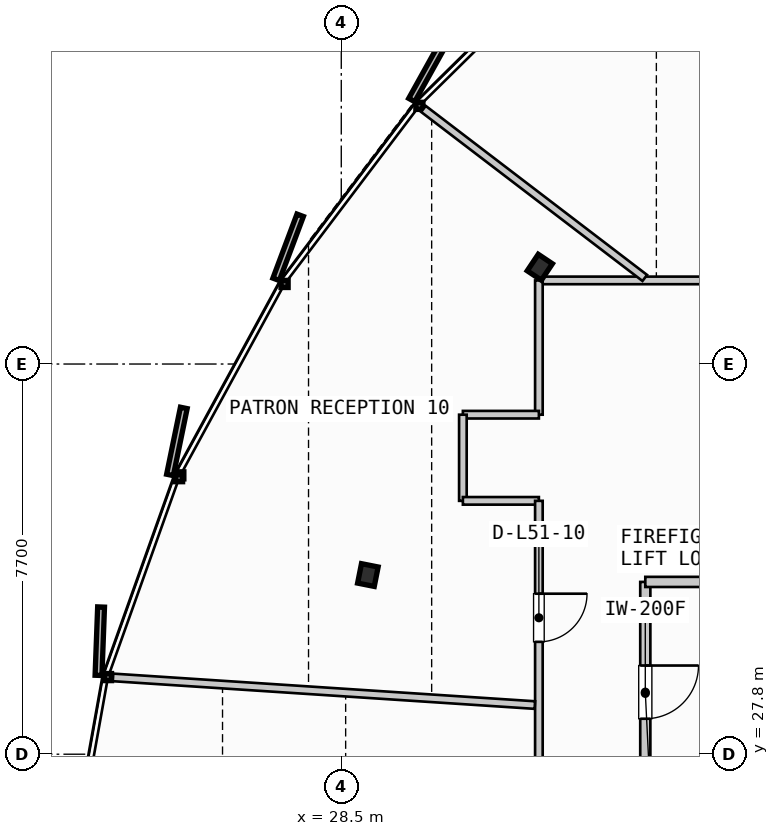
"""IFC4 building model, lengths in metres.
Left out: names, types, materials, properties, quantities, classifications, styles, units other than length and angle.
Written with IfcOpenShell. Run it as: python <this file> out.ifc"""

import sys

from ifc_helpers import new_model, si_unit, direction, frame, frame_2d, origin, origin_2d, place, context, subcontext, project, spatial, rectangle, i_section, extrude, source, transform, mapped, element, fill, save


model = new_model("IFC4")
c1 = context("Model", 3, precision=1e-05, world=origin(), true_north=direction((0.0, 1.0)))
c2 = subcontext(c1, "Body", "Model", "MODEL_VIEW")
j1 = project(units=[si_unit("LENGTHUNIT", "METRE"), si_unit("PLANEANGLEUNIT", "RADIAN")], contexts=[c1])
p1 = place(None, origin())
s1 = spatial("IfcSite", under=j1, at=p1, CompositionType="ELEMENT")
p2 = place(p1, origin())
s2 = spatial("IfcBuilding", under=s1, at=p2, CompositionType="ELEMENT")
p3 = place(p2, frame((0.0, 0.0, 197.4)))
s3 = spatial("IfcBuildingStorey", under=s2, at=p3, CompositionType="ELEMENT", Elevation=197.4)
m1 = source(origin(), c2, "Body", "SweptSolid", [
    extrude(i_section(OverallWidth=0.391, OverallDepth=0.335, WebThickness=0.023, FlangeThickness=0.034, FilletRadius=0.015, at=origin_2d()), origin(), (0.0, 0.0, 1.0), 3.26),
])
for number, where, z_axis, x_axis in (
    (1, (32.418, 37.409, 0.0), (0.0, 0.0, 1.0), (-0.831, 0.556, 0.0)),
    (2, (29.025, 31.336, 0.0), (0.0, 0.0, 1.0), (-0.981, 0.195, 0.0)),
):
    element("IfcColumn", number, at=place(p3, frame(where, z_axis=z_axis, x_axis=x_axis)), inside=s3, PredefinedType="COLUMN", context=c2, shape_type="MappedRepresentation", body=[
        mapped(m1, transform((0.0, 0.0, 0.0), scale=1.0)),
    ])
p4 = place(p3, frame((34.5, 31.2, 0.0), z_axis=(0.0, 0.0, 1.0), x_axis=(0.0, -1.0, 0.0)))
e3 = element("IfcWall", 3, at=p4, inside=s3, PredefinedType="PARTITIONING", context=c2, shape_type="SweptSolid", body=[
    extrude(rectangle(XDim=4.4, YDim=0.2, at=frame_2d((2.2, 0.0))), origin(), (0.0, 0.0, 1.0), 2.595),
])
p5 = place(p4, frame((1.65, 0.0, 0.0)))
e4 = element("IfcOpeningElement", 4, at=p5, cuts=e3, PredefinedType="OPENING", context=c2, shape_type="SweptSolid", body=[
    extrude(rectangle(XDim=1.05, YDim=2.15, at=frame_2d((0.525, 1.075))), frame((0.0, 0.11, 0.0), z_axis=(0.0, -1.0, 0.0), x_axis=(1.0, 0.0, 0.0)), (0.0, 0.0, 1.0), 0.22),
])
p6 = place(p3, frame((34.5, 31.2, 0.0), z_axis=(0.0, 0.0, 1.0), x_axis=(1.0, 0.0, 0.0)))
e5 = element("IfcWall", 5, at=p6, inside=s3, PredefinedType="PARTITIONING", context=c2, shape_type="SweptSolid", body=[
    extrude(rectangle(XDim=3.215, YDim=0.2, at=frame_2d((1.607, 0.0))), origin(), (0.0, 0.0, 1.0), 2.595),
])
p7 = place(p3, frame((60.75, 37.15, 0.0), z_axis=(0.0, 0.0, 1.0), x_axis=(-1.0, 0.0, 0.0)))
e6 = element("IfcWall", 6, at=p7, inside=s3, PredefinedType="PARTITIONING", context=c2, shape_type="SweptSolid", body=[
    extrude(rectangle(XDim=28.35, YDim=0.15, at=frame_2d((14.175, 0.0))), origin(), (0.0, 0.0, 1.0), 2.595),
])
p8 = place(p7, frame((4.612, 0.0, 0.0)))
e7 = element("IfcOpeningElement", 7, at=p8, cuts=e6, PredefinedType="OPENING", context=c2, shape_type="SweptSolid", body=[
    extrude(rectangle(XDim=0.95, YDim=2.15, at=frame_2d((0.475, 1.075))), frame((0.0, 0.085, 0.0), z_axis=(0.0, -1.0, 0.0), x_axis=(1.0, 0.0, 0.0)), (0.0, 0.0, 1.0), 0.17),
])
p9 = place(p7, frame((10.803, 0.0, 0.0)))
e8 = element("IfcOpeningElement", 8, at=p9, cuts=e6, PredefinedType="OPENING", context=c2, shape_type="SweptSolid", body=[
    extrude(rectangle(XDim=0.95, YDim=2.15, at=frame_2d((0.475, 1.075))), frame((0.0, 0.085, 0.0), z_axis=(0.0, -1.0, 0.0), x_axis=(1.0, 0.0, 0.0)), (0.0, 0.0, 1.0), 0.17),
])
p10 = place(p7, frame((15.534, 0.0, 0.0)))
e9 = element("IfcOpeningElement", 9, at=p10, cuts=e6, PredefinedType="OPENING", context=c2, shape_type="SweptSolid", body=[
    extrude(rectangle(XDim=0.95, YDim=2.15, at=frame_2d((0.475, 1.075))), frame((0.0, 0.085, 0.0), z_axis=(0.0, -1.0, 0.0), x_axis=(1.0, 0.0, 0.0)), (0.0, 0.0, 1.0), 0.17),
])
p11 = place(p7, frame((22.208, 0.0, 0.0)))
e10 = element("IfcOpeningElement", 10, at=p11, cuts=e6, PredefinedType="OPENING", context=c2, shape_type="SweptSolid", body=[
    extrude(rectangle(XDim=0.95, YDim=2.15, at=frame_2d((0.475, 1.075))), frame((0.0, 0.085, 0.0), z_axis=(0.0, -1.0, 0.0), x_axis=(1.0, 0.0, 0.0)), (0.0, 0.0, 1.0), 0.17),
])
p12 = place(p3, frame((32.4, 37.15, 0.0), z_axis=(0.0, 0.0, 1.0), x_axis=(0.0, -1.0, 0.0)))
e11 = element("IfcWall", 11, at=p12, inside=s3, PredefinedType="PARTITIONING", context=c2, shape_type="SweptSolid", body=[
    extrude(rectangle(XDim=2.65, YDim=0.15, at=frame_2d((1.325, 0.0))), origin(), (0.0, 0.0, 1.0), 2.595),
])
p13 = place(p3, frame((32.4, 34.5, 0.0), z_axis=(0.0, 0.0, 1.0), x_axis=(-1.0, 0.0, 0.0)))
e12 = element("IfcWall", 12, at=p13, inside=s3, PredefinedType="PARTITIONING", context=c2, shape_type="SweptSolid", body=[
    extrude(rectangle(XDim=1.5, YDim=0.15, at=frame_2d((0.75, 0.0))), origin(), (0.0, 0.0, 1.0), 2.595),
])
p14 = place(p3, frame((30.9, 34.5, 0.0), z_axis=(0.0, 0.0, 1.0), x_axis=(0.0, -1.0, 0.0)))
e13 = element("IfcWall", 13, at=p14, inside=s3, PredefinedType="PARTITIONING", context=c2, shape_type="SweptSolid", body=[
    extrude(rectangle(XDim=1.7, YDim=0.15, at=frame_2d((0.85, 0.0))), origin(), (0.0, 0.0, 1.0), 2.595),
])
p15 = place(p3, frame((30.9, 32.8, 0.0), z_axis=(0.0, 0.0, 1.0), x_axis=(1.0, 0.0, 0.0)))
e14 = element("IfcWall", 14, at=p15, inside=s3, PredefinedType="PARTITIONING", context=c2, shape_type="SweptSolid", body=[
    extrude(rectangle(XDim=1.5, YDim=0.15, at=frame_2d((0.75, 0.0))), origin(), (0.0, 0.0, 1.0), 2.595),
])
p16 = place(p3, frame((32.4, 32.8, 0.0), z_axis=(0.0, 0.0, 1.0), x_axis=(0.0, -1.0, 0.0)))
e15 = element("IfcWall", 15, at=p16, inside=s3, PredefinedType="PARTITIONING", context=c2, shape_type="SweptSolid", body=[
    extrude(rectangle(XDim=10.0, YDim=0.15, at=frame_2d((5.0, 0.0))), origin(), (0.0, 0.0, 1.0), 2.595),
])
p17 = place(p16, frame((1.833, 0.0, 0.0)))
e16 = element("IfcOpeningElement", 16, at=p17, cuts=e15, PredefinedType="OPENING", context=c2, shape_type="SweptSolid", body=[
    extrude(rectangle(XDim=0.95, YDim=2.15, at=frame_2d((0.475, 1.075))), frame((0.0, 0.085, 0.0), z_axis=(0.0, -1.0, 0.0), x_axis=(1.0, 0.0, 0.0)), (0.0, 0.0, 1.0), 0.17),
])
p18 = place(p16, frame((6.252, 0.0, 0.0)))
e17 = element("IfcOpeningElement", 17, at=p18, cuts=e15, PredefinedType="OPENING", context=c2, shape_type="SweptSolid", body=[
    extrude(rectangle(XDim=0.95, YDim=2.15, at=frame_2d((0.475, 1.075))), frame((0.0, 0.085, 0.0), z_axis=(0.0, -1.0, 0.0), x_axis=(1.0, 0.0, 0.0)), (0.0, 0.0, 1.0), 0.17),
])
p19 = place(p3, frame((34.49, 37.198, 0.0), z_axis=(0.0, 0.0, 1.0), x_axis=(-0.794783785462, 0.606892687686, 0.0)))
e18 = element("IfcWall", 18, at=p19, inside=s3, PredefinedType="PARTITIONING", context=c2, shape_type="SweptSolid", body=[
    extrude(rectangle(XDim=5.496, YDim=0.15, at=frame_2d((2.748, 0.0))), origin(), (0.0, 0.0, 1.0), 2.595),
])
p20 = place(p3, frame((32.32, 28.77, 0.0), z_axis=(0.0, 0.0, 1.0), x_axis=(-0.997858734146, 0.06540601416, 0.0)))
e19 = element("IfcWall", 19, at=p20, inside=s3, PredefinedType="PARTITIONING", context=c2, shape_type="SweptSolid", body=[
    extrude(rectangle(XDim=8.343, YDim=0.15, at=frame_2d((4.171, 0.0))), origin(), (0.0, 0.0, 1.0), 2.595),
])
m2 = source(origin(), c2, "Body", "SweptSolid", [
    extrude(rectangle(XDim=1.05, YDim=2.15, at=frame_2d((0.525, 1.075))), frame((0.0, 0.025, 0.0), z_axis=(0.0, -1.0, 0.0), x_axis=(1.0, 0.0, 0.0)), (0.0, 0.0, 1.0), 0.05),
])
p21 = place(p5, origin())
e20 = element("IfcDoor", 20, at=p21, inside=s3, OperationType="SINGLE_SWING_LEFT", PredefinedType="DOOR", context=c2, shape_type="MappedRepresentation", body=[
    mapped(m2, transform((0.0, 0.0, 0.0), scale=1.0)),
])
fill(e4, e20)
m3 = source(origin(), c2, "Body", "SweptSolid", [
    extrude(rectangle(XDim=0.95, YDim=2.15, at=frame_2d((0.475, 1.075))), frame((0.0, 0.025, 0.0), z_axis=(0.0, -1.0, 0.0), x_axis=(1.0, 0.0, 0.0)), (0.0, 0.0, 1.0), 0.05),
])
p22 = place(p17, origin())
e21 = element("IfcDoor", 21, at=p22, inside=s3, OperationType="SINGLE_SWING_LEFT", PredefinedType="DOOR", context=c2, shape_type="MappedRepresentation", body=[
    mapped(m3, transform((0.0, 0.0, 0.0), scale=1.0)),
])
fill(e16, e21)
save(model, sys.argv[1])
